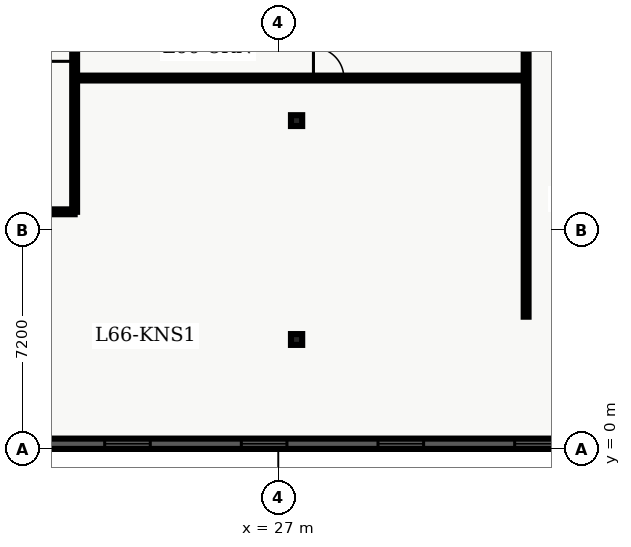
"""IFC4 building model, lengths in metres.
Left out: names, types, materials, properties, quantities, classifications, styles, units other than length and angle.
Written with IfcOpenShell. Run it as: python <this file> out.ifc"""

import sys

from ifc_helpers import new_model, entity, si_unit, converted_unit, direction, frame, origin_with_axes, origin_2d_with_axis, place, context, subcontext, project, spatial, polyline, rectangle, i_section, outline, extrude, element, fill, save


model = new_model("IFC4")
c1 = context("Model", 3, precision=1e-05, world=origin_with_axes(), true_north=direction((0.0, 1.0)))
c2 = subcontext(c1, "Body", "Model", "MODEL_VIEW")
j1 = project(units=[si_unit("LENGTHUNIT", "METRE"), converted_unit("PLANEANGLEUNIT", "DEGREE", entity("IfcPlaneAngleMeasure", 0.017), si_unit("PLANEANGLEUNIT", "RADIAN"), dimensions=[0, 0, 0, 0, 0, 0, 0])], contexts=[c1])
p1 = place(None, origin_with_axes())
s1 = spatial("IfcSite", under=j1, at=p1, CompositionType="ELEMENT")
p2 = place(p1, origin_with_axes())
s2 = spatial("IfcBuilding", under=s1, at=p2, CompositionType="ELEMENT")
p3 = place(p2, frame((0.0, 0.0, 268.5), z_axis=(0.0, 0.0, 1.0), x_axis=(1.0, 0.0, 0.0)))
s3 = spatial("IfcBuildingStorey", under=s2, at=p3, CompositionType="ELEMENT", Elevation=268.5)
for number, where, z_axis, x_axis in (
    (1, (27.6, 3.6, 0.0), (0.0, 0.0, 1.0), (1.0, 0.0, 0.0)),
    (2, (27.6, 10.8, 0.0), (0.0, 0.0, 1.0), (1.0, 0.0, 0.0)),
):
    element("IfcColumn", number, at=place(p3, frame(where, z_axis=z_axis, x_axis=x_axis)), inside=s3, PredefinedType="COLUMN", context=c2, shape_type="SweptSolid", body=[
        extrude(i_section(OverallWidth=0.369, OverallDepth=0.356, WebThickness=0.011, FlangeThickness=0.018, FilletRadius=0.018, at=origin_2d_with_axis()), origin_with_axes(), (0.0, 0.0, 1.0), 3.9),
    ])
p4 = place(p3, frame((8.135, 7.8, 0.0), z_axis=(0.0, 0.0, 1.0), x_axis=(1.0, 0.0, 0.0)))
e3 = element("IfcWall", 3, at=p4, inside=s3, PredefinedType="PARTITIONING", context=c2, shape_type="SweptSolid", body=[
    extrude(outline(polyline([(0.0, -0.08), (12.165, -0.08), (12.165, 0.08), (0.0, 0.08), (0.0, -0.08)])), origin_with_axes(), (0.0, 0.0, 1.0), 2.7),
])
p5 = place(p4, frame((3.967, 0.0, 0.0), z_axis=(0.0, 0.0, 1.0), x_axis=(1.0, 0.0, 0.0)))
e4 = element("IfcOpeningElement", 4, at=p5, cuts=e3, PredefinedType="OPENING", context=c2, shape_type="SweptSolid", body=[
    extrude(rectangle(XDim=1.0, YDim=0.18, at=origin_2d_with_axis()), origin_with_axes(), (0.0, 0.0, 1.0), 2.15),
])
p6 = place(p4, frame((8.768, 0.0, 0.0), z_axis=(0.0, 0.0, 1.0), x_axis=(1.0, 0.0, 0.0)))
e5 = element("IfcOpeningElement", 5, at=p6, cuts=e3, PredefinedType="OPENING", context=c2, shape_type="SweptSolid", body=[
    extrude(rectangle(XDim=1.0, YDim=0.18, at=origin_2d_with_axis()), origin_with_axes(), (0.0, 0.0, 1.0), 2.15),
])
p7 = place(p3, frame((20.3, 7.8, 0.0), z_axis=(0.0, 0.0, 1.0), x_axis=(0.0, 1.0, 0.0)))
e6 = element("IfcWall", 6, at=p7, inside=s3, PredefinedType="PARTITIONING", context=c2, shape_type="SweptSolid", body=[
    extrude(outline(polyline([(0.0, -0.08), (32.7, -0.08), (32.7, 0.08), (0.0, 0.08), (0.0, -0.08)])), origin_with_axes(), (0.0, 0.0, 1.0), 2.7),
])
p8 = place(p7, frame((14.2, 0.0, 0.0), z_axis=(0.0, 0.0, 1.0), x_axis=(1.0, 0.0, 0.0)))
e7 = element("IfcOpeningElement", 7, at=p8, cuts=e6, PredefinedType="OPENING", context=c2, shape_type="SweptSolid", body=[
    extrude(rectangle(XDim=1.0, YDim=0.18, at=origin_2d_with_axis()), origin_with_axes(), (0.0, 0.0, 1.0), 2.15),
])
p9 = place(p7, frame((18.215, 0.0, 0.0), z_axis=(0.0, 0.0, 1.0), x_axis=(1.0, 0.0, 0.0)))
e8 = element("IfcOpeningElement", 8, at=p9, cuts=e6, PredefinedType="OPENING", context=c2, shape_type="SweptSolid", body=[
    extrude(rectangle(XDim=1.0, YDim=0.18, at=origin_2d_with_axis()), origin_with_axes(), (0.0, 0.0, 1.0), 2.15),
])
p10 = place(p7, frame((22.221, 0.0, 0.0), z_axis=(0.0, 0.0, 1.0), x_axis=(1.0, 0.0, 0.0)))
e9 = element("IfcOpeningElement", 9, at=p10, cuts=e6, PredefinedType="OPENING", context=c2, shape_type="SweptSolid", body=[
    extrude(rectangle(XDim=1.0, YDim=0.18, at=origin_2d_with_axis()), origin_with_axes(), (0.0, 0.0, 1.0), 2.15),
])
p11 = place(p7, frame((25.553, 0.0, 0.0), z_axis=(0.0, 0.0, 1.0), x_axis=(1.0, 0.0, 0.0)))
e10 = element("IfcOpeningElement", 10, at=p11, cuts=e6, PredefinedType="OPENING", context=c2, shape_type="SweptSolid", body=[
    extrude(rectangle(XDim=1.0, YDim=0.18, at=origin_2d_with_axis()), origin_with_axes(), (0.0, 0.0, 1.0), 2.15),
])
p12 = place(p7, frame((5.475, 0.0, 0.0), z_axis=(0.0, 0.0, 1.0), x_axis=(1.0, 0.0, 0.0)))
e11 = element("IfcOpeningElement", 11, at=p12, cuts=e6, PredefinedType="OPENING", context=c2, shape_type="SweptSolid", body=[
    extrude(rectangle(XDim=1.05, YDim=0.18, at=origin_2d_with_axis()), origin_with_axes(), (0.0, 0.0, 1.0), 2.15),
])
p13 = place(p3, frame((20.3, 12.2, 0.0), z_axis=(0.0, 0.0, 1.0), x_axis=(1.0, 0.0, 0.0)))
e12 = element("IfcWall", 12, at=p13, inside=s3, PredefinedType="PARTITIONING", context=c2, shape_type="SweptSolid", body=[
    extrude(outline(polyline([(0.0, -0.08), (14.85, -0.08), (14.85, 0.08), (0.0, 0.08), (0.0, -0.08)])), origin_with_axes(), (0.0, 0.0, 1.0), 2.7),
])
p14 = place(p13, frame((8.355, 0.0, 0.0), z_axis=(0.0, 0.0, 1.0), x_axis=(1.0, 0.0, 0.0)))
e13 = element("IfcOpeningElement", 13, at=p14, cuts=e12, PredefinedType="OPENING", context=c2, shape_type="SweptSolid", body=[
    extrude(rectangle(XDim=1.0, YDim=0.18, at=origin_2d_with_axis()), origin_with_axes(), (0.0, 0.0, 1.0), 2.15),
])
p15 = place(p3, frame((35.15, 4.35, 0.0), z_axis=(0.0, 0.0, 1.0), x_axis=(0.0, 1.0, 0.0)))
e14 = element("IfcWall", 14, at=p15, inside=s3, PredefinedType="PARTITIONING", context=c2, shape_type="SweptSolid", body=[
    extrude(outline(polyline([(0.0, -0.08), (16.95, -0.08), (16.95, 0.08), (0.0, 0.08), (0.0, -0.08)])), origin_with_axes(), (0.0, 0.0, 1.0), 2.7),
])
p16 = place(p3, frame((47.36, 0.17, 0.0), z_axis=(0.0, 0.0, 1.0), x_axis=(-1.0, 0.0, 0.0)))
e15 = element("IfcWall", 15, at=p16, inside=s3, PredefinedType="SOLIDWALL", context=c2, shape_type="SweptSolid", body=[
    extrude(outline(polyline([(0.0, -0.17), (37.16, -0.17), (37.16, 0.17), (0.0, 0.17), (0.0, -0.17)])), origin_with_axes(), (0.0, 0.0, 1.0), 3.66),
])
p17 = place(p16, frame((2.847, 0.0, 0.45), z_axis=(0.0, 0.0, 1.0), x_axis=(1.0, 0.0, 0.0)))
e16 = element("IfcOpeningElement", 16, at=p17, cuts=e15, PredefinedType="OPENING", context=c2, shape_type="SweptSolid", body=[
    extrude(rectangle(XDim=1.5, YDim=0.36, at=origin_2d_with_axis()), origin_with_axes(), (0.0, 0.0, 1.0), 2.1),
])
p18 = place(p16, frame((7.342, 0.0, 0.45), z_axis=(0.0, 0.0, 1.0), x_axis=(1.0, 0.0, 0.0)))
e17 = element("IfcOpeningElement", 17, at=p18, cuts=e15, PredefinedType="OPENING", context=c2, shape_type="SweptSolid", body=[
    extrude(rectangle(XDim=1.5, YDim=0.36, at=origin_2d_with_axis()), origin_with_axes(), (0.0, 0.0, 1.0), 2.1),
])
p19 = place(p16, frame((11.837, 0.0, 0.45), z_axis=(0.0, 0.0, 1.0), x_axis=(1.0, 0.0, 0.0)))
e18 = element("IfcOpeningElement", 18, at=p19, cuts=e15, PredefinedType="OPENING", context=c2, shape_type="SweptSolid", body=[
    extrude(rectangle(XDim=1.5, YDim=0.36, at=origin_2d_with_axis()), origin_with_axes(), (0.0, 0.0, 1.0), 2.1),
])
p20 = place(p16, frame((16.332, 0.0, 0.45), z_axis=(0.0, 0.0, 1.0), x_axis=(1.0, 0.0, 0.0)))
e19 = element("IfcOpeningElement", 19, at=p20, cuts=e15, PredefinedType="OPENING", context=c2, shape_type="SweptSolid", body=[
    extrude(rectangle(XDim=1.5, YDim=0.36, at=origin_2d_with_axis()), origin_with_axes(), (0.0, 0.0, 1.0), 2.1),
])
p21 = place(p16, frame((20.827, 0.0, 0.45), z_axis=(0.0, 0.0, 1.0), x_axis=(1.0, 0.0, 0.0)))
e20 = element("IfcOpeningElement", 20, at=p21, cuts=e15, PredefinedType="OPENING", context=c2, shape_type="SweptSolid", body=[
    extrude(rectangle(XDim=1.5, YDim=0.36, at=origin_2d_with_axis()), origin_with_axes(), (0.0, 0.0, 1.0), 2.1),
])
p22 = place(p16, frame((25.322, 0.0, 0.45), z_axis=(0.0, 0.0, 1.0), x_axis=(1.0, 0.0, 0.0)))
e21 = element("IfcOpeningElement", 21, at=p22, cuts=e15, PredefinedType="OPENING", context=c2, shape_type="SweptSolid", body=[
    extrude(rectangle(XDim=1.5, YDim=0.36, at=origin_2d_with_axis()), origin_with_axes(), (0.0, 0.0, 1.0), 2.1),
])
p23 = place(p16, frame((29.817, 0.0, 0.45), z_axis=(0.0, 0.0, 1.0), x_axis=(1.0, 0.0, 0.0)))
e22 = element("IfcOpeningElement", 22, at=p23, cuts=e15, PredefinedType="OPENING", context=c2, shape_type="SweptSolid", body=[
    extrude(rectangle(XDim=1.5, YDim=0.36, at=origin_2d_with_axis()), origin_with_axes(), (0.0, 0.0, 1.0), 2.1),
])
p24 = place(p16, frame((34.312, 0.0, 0.45), z_axis=(0.0, 0.0, 1.0), x_axis=(1.0, 0.0, 0.0)))
e23 = element("IfcOpeningElement", 23, at=p24, cuts=e15, PredefinedType="OPENING", context=c2, shape_type="SweptSolid", body=[
    extrude(rectangle(XDim=1.5, YDim=0.36, at=origin_2d_with_axis()), origin_with_axes(), (0.0, 0.0, 1.0), 2.1),
])
p25 = place(p7, frame((5.475, 0.0, 0.0), z_axis=(0.0, 0.0, 1.0), x_axis=(1.0, 0.0, 0.0)))
e24 = element("IfcDoor", 24, at=p25, inside=s3, OperationType="SINGLE_SWING_LEFT", PredefinedType="DOOR", context=c2, shape_type="SweptSolid", body=[
    extrude(rectangle(XDim=1.05, YDim=0.09, at=origin_2d_with_axis()), origin_with_axes(), (0.0, 0.0, 1.0), 2.15),
])
fill(e11, e24)
p26 = place(p13, frame((8.355, 0.0, 0.0), z_axis=(0.0, 0.0, 1.0), x_axis=(1.0, 0.0, 0.0)))
e25 = element("IfcDoor", 25, at=p26, inside=s3, OperationType="SINGLE_SWING_LEFT", PredefinedType="DOOR", context=c2, shape_type="SweptSolid", body=[
    extrude(rectangle(XDim=1.0, YDim=0.09, at=origin_2d_with_axis()), origin_with_axes(), (0.0, 0.0, 1.0), 2.15),
])
fill(e13, e25)
p27 = place(p16, frame((11.837, 0.0, 0.45), z_axis=(0.0, 0.0, 1.0), x_axis=(1.0, 0.0, 0.0)))
e26 = element("IfcWindow", 26, at=p27, inside=s3, PredefinedType="WINDOW", context=c2, shape_type="SweptSolid", body=[
    extrude(rectangle(XDim=1.5, YDim=0.09, at=origin_2d_with_axis()), origin_with_axes(), (0.0, 0.0, 1.0), 2.1),
])
fill(e18, e26)
p28 = place(p16, frame((16.332, 0.0, 0.45), z_axis=(0.0, 0.0, 1.0), x_axis=(1.0, 0.0, 0.0)))
e27 = element("IfcWindow", 27, at=p28, inside=s3, PredefinedType="WINDOW", context=c2, shape_type="SweptSolid", body=[
    extrude(rectangle(XDim=1.5, YDim=0.09, at=origin_2d_with_axis()), origin_with_axes(), (0.0, 0.0, 1.0), 2.1),
])
fill(e19, e27)
p29 = place(p16, frame((20.827, 0.0, 0.45), z_axis=(0.0, 0.0, 1.0), x_axis=(1.0, 0.0, 0.0)))
e28 = element("IfcWindow", 28, at=p29, inside=s3, PredefinedType="WINDOW", context=c2, shape_type="SweptSolid", body=[
    extrude(rectangle(XDim=1.5, YDim=0.09, at=origin_2d_with_axis()), origin_with_axes(), (0.0, 0.0, 1.0), 2.1),
])
fill(e20, e28)
p30 = place(p16, frame((25.322, 0.0, 0.45), z_axis=(0.0, 0.0, 1.0), x_axis=(1.0, 0.0, 0.0)))
e29 = element("IfcWindow", 29, at=p30, inside=s3, PredefinedType="WINDOW", context=c2, shape_type="SweptSolid", body=[
    extrude(rectangle(XDim=1.5, YDim=0.09, at=origin_2d_with_axis()), origin_with_axes(), (0.0, 0.0, 1.0), 2.1),
])
fill(e21, e29)
save(model, sys.argv[1])
